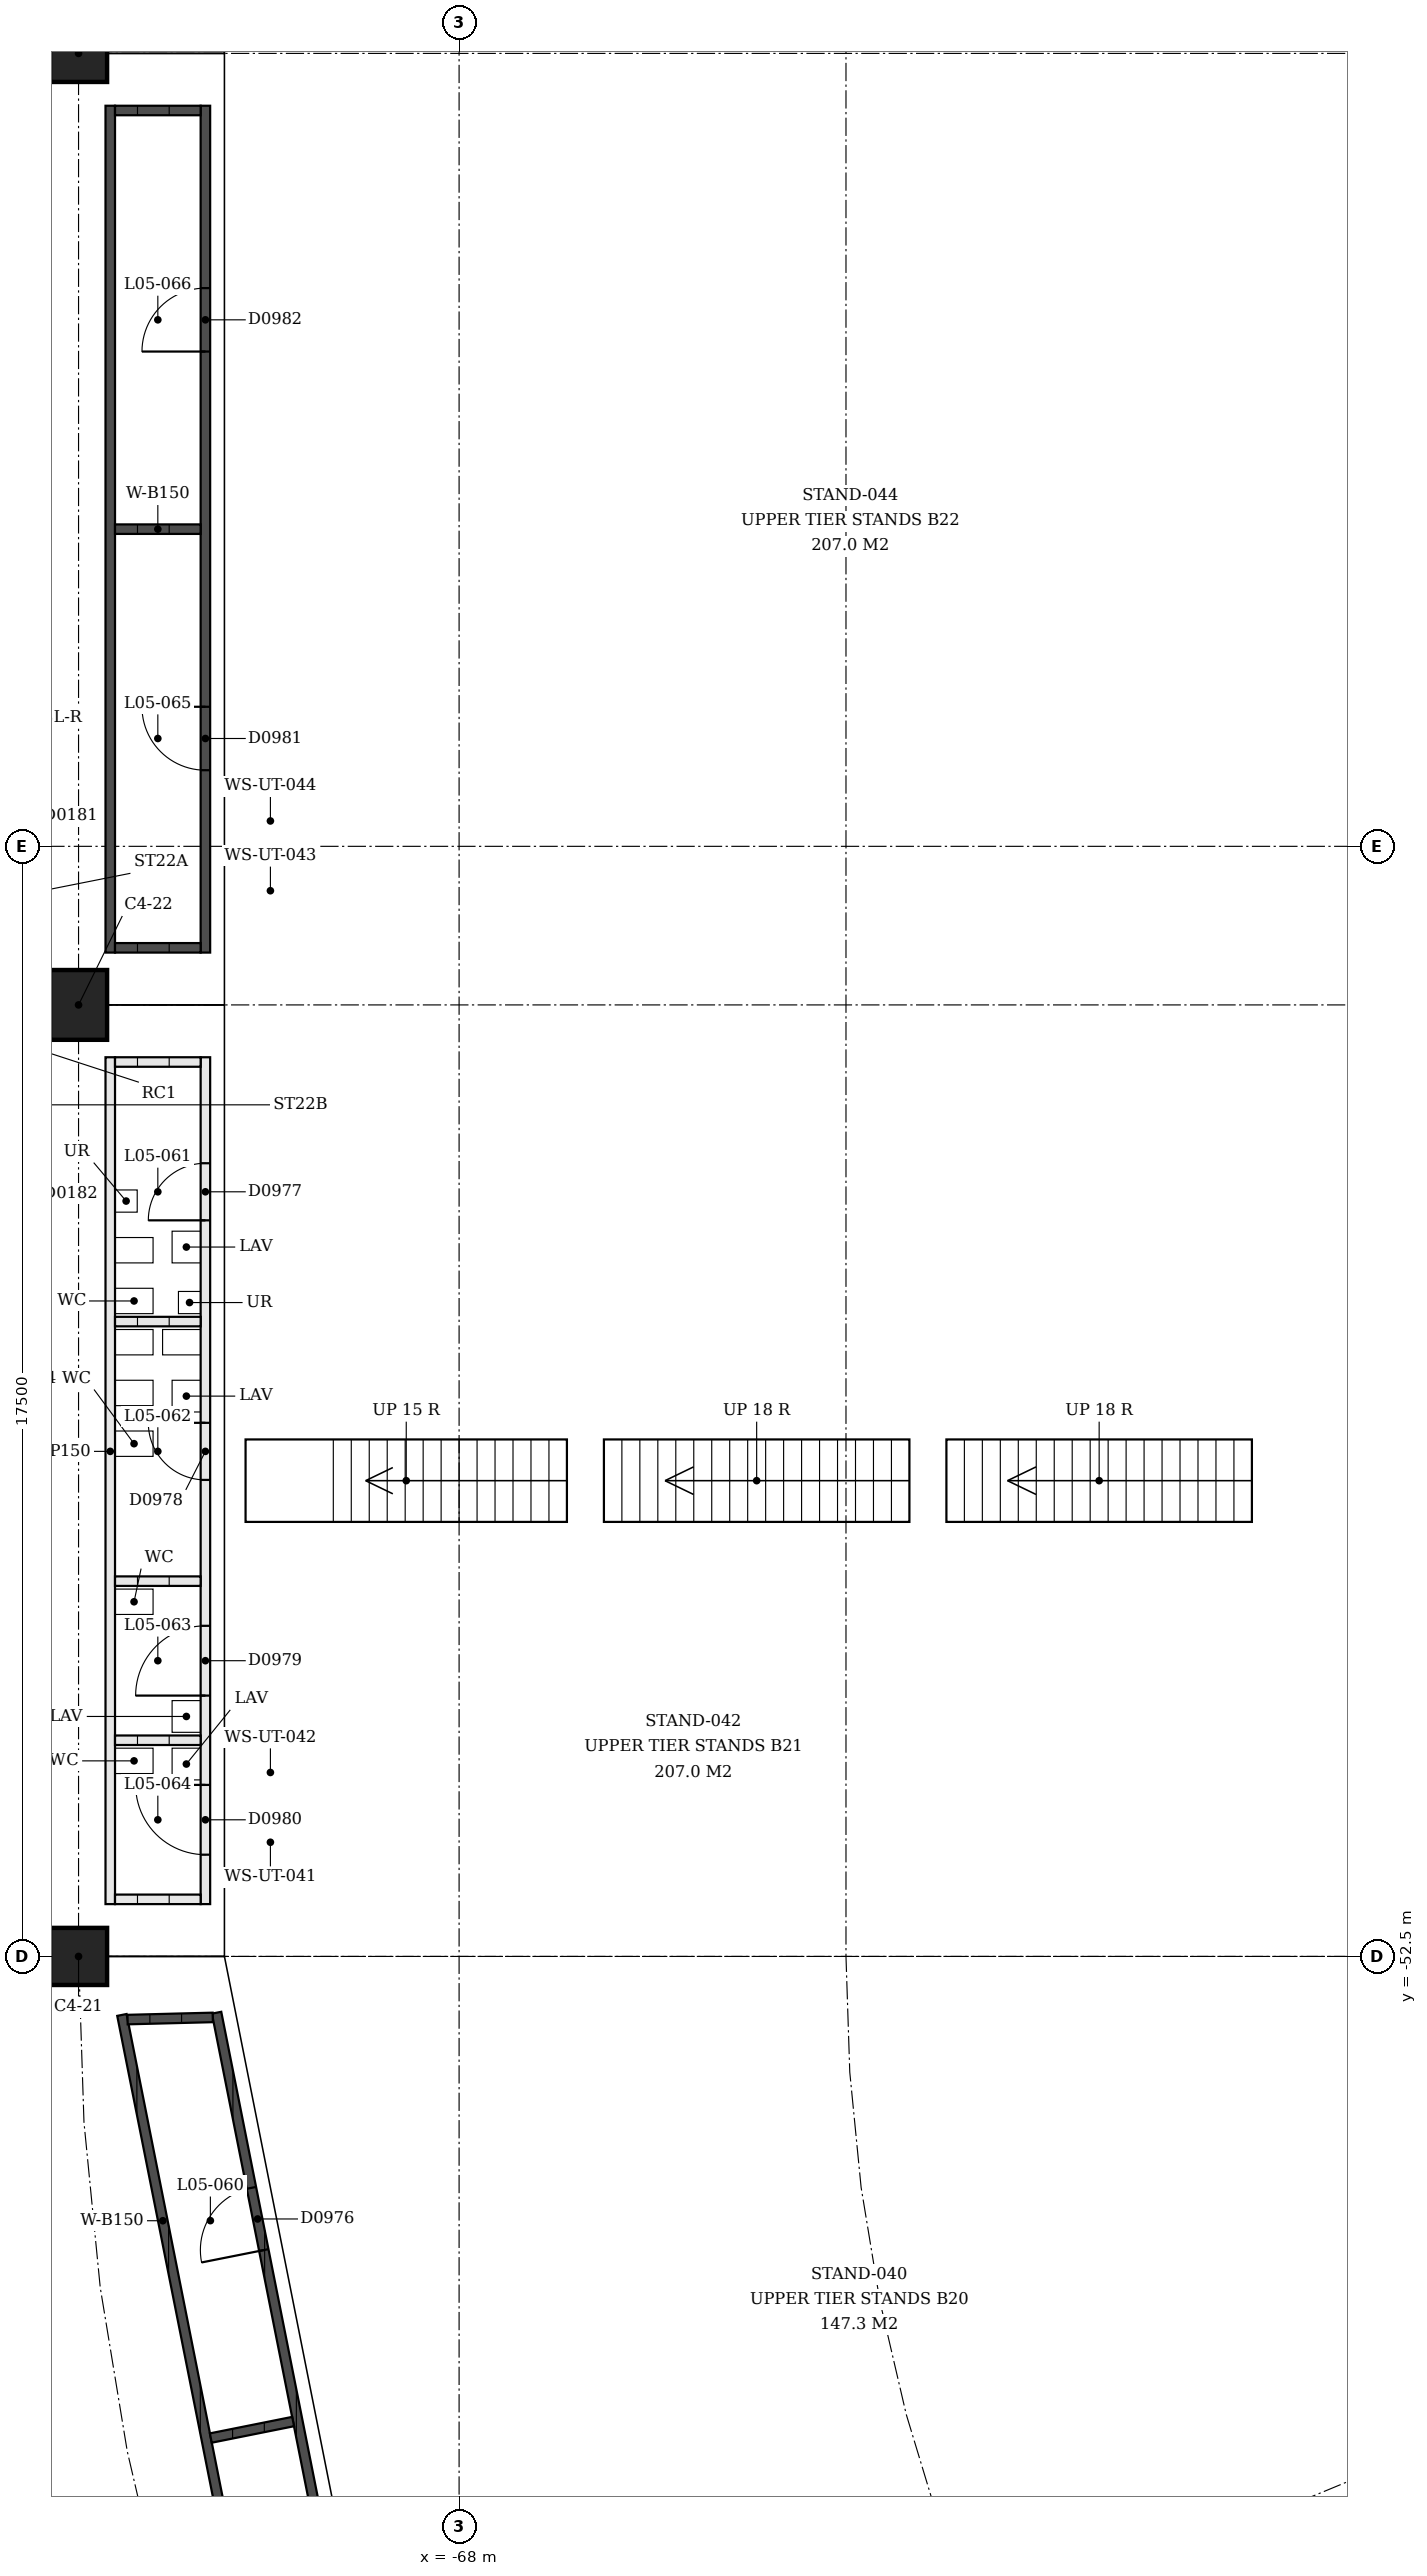
"""IFC4 building model, lengths in metres.
Left out: names, types, materials, properties, quantities, classifications, styles, units other than length and angle.
Written with IfcOpenShell. Run it as: python <this file> out.ifc"""

import sys

from ifc_helpers import new_model, si_unit, direction, frame, frame_2d, origin, origin_2d, place, context, subcontext, project, spatial, rectangle, extrude, element, fill, save


model = new_model("IFC4")
c1 = context("Model", 3, precision=1e-05, world=origin(), true_north=direction((0.0, 1.0)))
c2 = subcontext(c1, "Body", "Model", "MODEL_VIEW")
j1 = project(units=[si_unit("LENGTHUNIT", "METRE"), si_unit("PLANEANGLEUNIT", "RADIAN")], contexts=[c1])
p1 = place(None, origin())
s1 = spatial("IfcSite", under=j1, at=p1, CompositionType="ELEMENT")
p2 = place(p1, origin())
s2 = spatial("IfcBuilding", under=s1, at=p2, CompositionType="ELEMENT")
p3 = place(p2, frame((0.0, 0.0, 22.5)))
s3 = spatial("IfcBuildingStorey", under=s2, at=p3, CompositionType="ELEMENT", Elevation=22.5)
p4 = place(p3, frame((-74.0, -52.5, 0.0), z_axis=(0.0, 0.0, 1.0), x_axis=(0.0, -1.0, 0.0)))
e1 = element("IfcColumn", 1, at=p4, inside=s3, PredefinedType="COLUMN", context=c2, shape_type="SweptSolid", body=[
    extrude(rectangle(XDim=0.9, YDim=0.9, at=origin_2d()), origin(), (0.0, 0.0, 1.0), 6.5),
])
p5 = place(p3, frame((-74.0, -37.5, 0.0), z_axis=(0.0, 0.0, 1.0), x_axis=(0.0, -1.0, 0.0)))
e2 = element("IfcColumn", 2, at=p5, inside=s3, PredefinedType="COLUMN", context=c2, shape_type="SweptSolid", body=[
    extrude(rectangle(XDim=1.1, YDim=0.9, at=origin_2d()), origin(), (0.0, 0.0, 1.0), 6.5),
])
p6 = place(p3, frame((-74.0, -22.5, 0.0), z_axis=(0.0, 0.0, 1.0), x_axis=(0.0, -1.0, 0.0)))
e3 = element("IfcColumn", 3, at=p6, inside=s3, PredefinedType="COLUMN", context=c2, shape_type="SweptSolid", body=[
    extrude(rectangle(XDim=0.9, YDim=0.9, at=origin_2d()), origin(), (0.0, 0.0, 1.0), 6.5),
])
p7 = place(p3, frame((-69.265, -66.249, 0.0), z_axis=(0.0, 0.0, 1.0), x_axis=(-0.195095631841, 0.980784224198, 0.0)))
e4 = element("IfcWall", 4, at=p7, inside=s3, PredefinedType="SOLIDWALL", context=c2, shape_type="SweptSolid", body=[
    extrude(rectangle(XDim=13.113, YDim=0.15, at=frame_2d((6.557, 0.0))), origin(), (0.0, 0.0, 1.0), 3.0),
])
p8 = place(p7, frame((2.815, 0.0, 0.0)))
e5 = element("IfcOpeningElement", 5, at=p8, cuts=e4, PredefinedType="OPENING", context=c2, shape_type="SweptSolid", body=[
    extrude(rectangle(XDim=1.0, YDim=2.1, at=frame_2d((0.5, 1.05))), frame((0.0, 0.075, 0.0), z_axis=(0.0, -1.0, 0.0), x_axis=(1.0, 0.0, 0.0)), (0.0, 0.0, 1.0), 0.15),
])
p9 = place(p7, frame((9.298, 0.0, 0.0)))
e6 = element("IfcOpeningElement", 6, at=p9, cuts=e4, PredefinedType="OPENING", context=c2, shape_type="SweptSolid", body=[
    extrude(rectangle(XDim=1.0, YDim=2.1, at=frame_2d((0.5, 1.05))), frame((0.0, 0.075, 0.0), z_axis=(0.0, -1.0, 0.0), x_axis=(1.0, 0.0, 0.0)), (0.0, 0.0, 1.0), 0.15),
])
p10 = place(p3, frame((-70.657, -66.791, 0.0), z_axis=(0.0, 0.0, 1.0), x_axis=(-0.195103376128, 0.980782683689, 0.0)))
e7 = element("IfcWall", 7, at=p10, inside=s3, PredefinedType="SOLIDWALL", context=c2, shape_type="SweptSolid", body=[
    extrude(rectangle(XDim=13.631, YDim=0.15, at=frame_2d((6.815, 0.0))), origin(), (0.0, 0.0, 1.0), 3.0),
])
p11 = place(p3, frame((-70.616, -59.832, 0.0), z_axis=(0.0, 0.0, 1.0), x_axis=(-0.980531003602, -0.196364332237, 0.0)))
e8 = element("IfcWall", 8, at=p11, inside=s3, PredefinedType="SOLIDWALL", context=c2, shape_type="SweptSolid", body=[
    extrude(rectangle(XDim=1.324, YDim=0.15, at=frame_2d((0.662, 0.0))), origin(), (0.0, 0.0, 1.0), 3.0),
])
p12 = place(p3, frame((-71.884, -53.461, 0.0), z_axis=(0.0, 0.0, 1.0), x_axis=(-0.999681029438, -0.025255482205, 0.0)))
e9 = element("IfcWall", 9, at=p12, inside=s3, PredefinedType="SOLIDWALL", context=c2, shape_type="SweptSolid", body=[
    extrude(rectangle(XDim=1.344, YDim=0.15, at=frame_2d((0.672, 0.0))), origin(), (0.0, 0.0, 1.0), 3.0),
])
p13 = place(p3, frame((-72.0, -38.325, 0.0), z_axis=(0.0, 0.0, 1.0), x_axis=(0.0, -1.0, 0.0)))
e10 = element("IfcWall", 10, at=p13, inside=s3, PredefinedType="PARTITIONING", context=c2, shape_type="SweptSolid", body=[
    extrude(rectangle(XDim=13.35, YDim=0.15, at=frame_2d((6.675, 0.0))), origin(), (0.0, 0.0, 1.0), 3.0),
])
p14 = place(p13, frame((1.671, 0.0, 0.0)))
e11 = element("IfcOpeningElement", 11, at=p14, cuts=e10, PredefinedType="OPENING", context=c2, shape_type="SweptSolid", body=[
    extrude(rectangle(XDim=0.9, YDim=2.1, at=frame_2d((0.45, 1.05))), frame((0.0, 0.075, 0.0), z_axis=(0.0, -1.0, 0.0), x_axis=(1.0, 0.0, 0.0)), (0.0, 0.0, 1.0), 0.15),
])
p15 = place(p13, frame((5.763, 0.0, 0.0)))
e12 = element("IfcOpeningElement", 12, at=p15, cuts=e10, PredefinedType="OPENING", context=c2, shape_type="SweptSolid", body=[
    extrude(rectangle(XDim=0.9, YDim=2.1, at=frame_2d((0.45, 1.05))), frame((0.0, 0.075, 0.0), z_axis=(0.0, -1.0, 0.0), x_axis=(1.0, 0.0, 0.0)), (0.0, 0.0, 1.0), 0.15),
])
p16 = place(p13, frame((8.963, 0.0, 0.0)))
e13 = element("IfcOpeningElement", 13, at=p16, cuts=e10, PredefinedType="OPENING", context=c2, shape_type="SweptSolid", body=[
    extrude(rectangle(XDim=1.1, YDim=2.1, at=frame_2d((0.55, 1.05))), frame((0.0, 0.075, 0.0), z_axis=(0.0, -1.0, 0.0), x_axis=(1.0, 0.0, 0.0)), (0.0, 0.0, 1.0), 0.15),
])
p17 = place(p13, frame((11.471, 0.0, 0.0)))
e14 = element("IfcOpeningElement", 14, at=p17, cuts=e10, PredefinedType="OPENING", context=c2, shape_type="SweptSolid", body=[
    extrude(rectangle(XDim=1.1, YDim=2.1, at=frame_2d((0.55, 1.05))), frame((0.0, 0.075, 0.0), z_axis=(0.0, -1.0, 0.0), x_axis=(1.0, 0.0, 0.0)), (0.0, 0.0, 1.0), 0.15),
])
p18 = place(p3, frame((-73.5, -38.325, 0.0), z_axis=(0.0, 0.0, 1.0), x_axis=(0.0, -1.0, 0.0)))
e15 = element("IfcWall", 15, at=p18, inside=s3, PredefinedType="PARTITIONING", context=c2, shape_type="SweptSolid", body=[
    extrude(rectangle(XDim=13.35, YDim=0.15, at=frame_2d((6.675, 0.0))), origin(), (0.0, 0.0, 1.0), 3.0),
])
for number, where, z_axis, x_axis in (
    (16, (-72.075, -38.4, 0.0), (0.0, 0.0, 1.0), (-1.0, 0.0, 0.0)),
    (17, (-72.075, -42.492, 0.0), (0.0, 0.0, 1.0), (-1.0, 0.0, 0.0)),
    (18, (-72.075, -46.584, 0.0), (0.0, 0.0, 1.0), (-1.0, 0.0, 0.0)),
    (19, (-72.075, -49.092, 0.0), (0.0, 0.0, 1.0), (-1.0, 0.0, 0.0)),
    (20, (-72.075, -51.6, 0.0), (0.0, 0.0, 1.0), (-1.0, 0.0, 0.0)),
):
    element("IfcWall", number, at=place(p3, frame(where, z_axis=z_axis, x_axis=x_axis)), inside=s3, PredefinedType="PARTITIONING", context=c2, shape_type="SweptSolid", body=[
        extrude(rectangle(XDim=1.35, YDim=0.15, at=frame_2d((0.675, 0.0))), origin(), (0.0, 0.0, 1.0), 3.0),
    ])
p19 = place(p3, frame((-72.0, -36.675, 0.0), z_axis=(0.0, 0.0, 1.0), x_axis=(0.0, 1.0, 0.0)))
e21 = element("IfcWall", 21, at=p19, inside=s3, PredefinedType="SOLIDWALL", context=c2, shape_type="SweptSolid", body=[
    extrude(rectangle(XDim=13.35, YDim=0.15, at=frame_2d((6.675, 0.0))), origin(), (0.0, 0.0, 1.0), 3.0),
])
p20 = place(p19, frame((2.875, 0.0, 0.0)))
e22 = element("IfcOpeningElement", 22, at=p20, cuts=e21, PredefinedType="OPENING", context=c2, shape_type="SweptSolid", body=[
    extrude(rectangle(XDim=1.0, YDim=2.1, at=frame_2d((0.5, 1.05))), frame((0.0, 0.075, 0.0), z_axis=(0.0, -1.0, 0.0), x_axis=(1.0, 0.0, 0.0)), (0.0, 0.0, 1.0), 0.15),
])
p21 = place(p19, frame((9.475, 0.0, 0.0)))
e23 = element("IfcOpeningElement", 23, at=p21, cuts=e21, PredefinedType="OPENING", context=c2, shape_type="SweptSolid", body=[
    extrude(rectangle(XDim=1.0, YDim=2.1, at=frame_2d((0.5, 1.05))), frame((0.0, 0.075, 0.0), z_axis=(0.0, -1.0, 0.0), x_axis=(1.0, 0.0, 0.0)), (0.0, 0.0, 1.0), 0.15),
])
p22 = place(p3, frame((-73.5, -36.675, 0.0), z_axis=(0.0, 0.0, 1.0), x_axis=(0.0, 1.0, 0.0)))
e24 = element("IfcWall", 24, at=p22, inside=s3, PredefinedType="SOLIDWALL", context=c2, shape_type="SweptSolid", body=[
    extrude(rectangle(XDim=13.35, YDim=0.15, at=frame_2d((6.675, 0.0))), origin(), (0.0, 0.0, 1.0), 3.0),
])
for number, where, z_axis, x_axis in (
    (25, (-72.075, -36.6, 0.0), (0.0, 0.0, 1.0), (-1.0, 0.0, 0.0)),
    (26, (-72.075, -30.0, 0.0), (0.0, 0.0, 1.0), (-1.0, 0.0, 0.0)),
    (27, (-72.075, -23.4, 0.0), (0.0, 0.0, 1.0), (-1.0, 0.0, 0.0)),
):
    element("IfcWall", number, at=place(p3, frame(where, z_axis=z_axis, x_axis=x_axis)), inside=s3, PredefinedType="SOLIDWALL", context=c2, shape_type="SweptSolid", body=[
        extrude(rectangle(XDim=1.35, YDim=0.15, at=frame_2d((0.675, 0.0))), origin(), (0.0, 0.0, 1.0), 3.0),
    ])
p23 = place(p9, origin())
e28 = element("IfcDoor", 28, at=p23, inside=s3, OperationType="SINGLE_SWING_RIGHT", PredefinedType="DOOR", context=c2, shape_type="SweptSolid", body=[
    extrude(rectangle(XDim=1.0, YDim=2.1, at=frame_2d((0.5, 1.05))), frame((0.0, 0.025, 0.0), z_axis=(0.0, -1.0, 0.0), x_axis=(1.0, 0.0, 0.0)), (0.0, 0.0, 1.0), 0.05),
])
fill(e6, e28)
p24 = place(p14, origin())
e29 = element("IfcDoor", 29, at=p24, inside=s3, OperationType="SINGLE_SWING_RIGHT", PredefinedType="DOOR", context=c2, shape_type="SweptSolid", body=[
    extrude(rectangle(XDim=0.9, YDim=2.1, at=frame_2d((0.45, 1.05))), frame((0.0, 0.025, 0.0), z_axis=(0.0, -1.0, 0.0), x_axis=(1.0, 0.0, 0.0)), (0.0, 0.0, 1.0), 0.05),
])
fill(e11, e29)
p25 = place(p15, origin())
e30 = element("IfcDoor", 30, at=p25, inside=s3, OperationType="SINGLE_SWING_LEFT", PredefinedType="DOOR", context=c2, shape_type="SweptSolid", body=[
    extrude(rectangle(XDim=0.9, YDim=2.1, at=frame_2d((0.45, 1.05))), frame((0.0, 0.025, 0.0), z_axis=(0.0, -1.0, 0.0), x_axis=(1.0, 0.0, 0.0)), (0.0, 0.0, 1.0), 0.05),
])
fill(e12, e30)
p26 = place(p16, origin())
e31 = element("IfcDoor", 31, at=p26, inside=s3, OperationType="SINGLE_SWING_RIGHT", PredefinedType="DOOR", context=c2, shape_type="SweptSolid", body=[
    extrude(rectangle(XDim=1.1, YDim=2.1, at=frame_2d((0.55, 1.05))), frame((0.0, 0.025, 0.0), z_axis=(0.0, -1.0, 0.0), x_axis=(1.0, 0.0, 0.0)), (0.0, 0.0, 1.0), 0.05),
])
fill(e13, e31)
p27 = place(p17, origin())
e32 = element("IfcDoor", 32, at=p27, inside=s3, OperationType="SINGLE_SWING_LEFT", PredefinedType="DOOR", context=c2, shape_type="SweptSolid", body=[
    extrude(rectangle(XDim=1.1, YDim=2.1, at=frame_2d((0.55, 1.05))), frame((0.0, 0.025, 0.0), z_axis=(0.0, -1.0, 0.0), x_axis=(1.0, 0.0, 0.0)), (0.0, 0.0, 1.0), 0.05),
])
fill(e14, e32)
p28 = place(p20, origin())
e33 = element("IfcDoor", 33, at=p28, inside=s3, OperationType="SINGLE_SWING_LEFT", PredefinedType="DOOR", context=c2, shape_type="SweptSolid", body=[
    extrude(rectangle(XDim=1.0, YDim=2.1, at=frame_2d((0.5, 1.05))), frame((0.0, 0.025, 0.0), z_axis=(0.0, -1.0, 0.0), x_axis=(1.0, 0.0, 0.0)), (0.0, 0.0, 1.0), 0.05),
])
fill(e22, e33)
p29 = place(p21, origin())
e34 = element("IfcDoor", 34, at=p29, inside=s3, OperationType="SINGLE_SWING_RIGHT", PredefinedType="DOOR", context=c2, shape_type="SweptSolid", body=[
    extrude(rectangle(XDim=1.0, YDim=2.1, at=frame_2d((0.5, 1.05))), frame((0.0, 0.025, 0.0), z_axis=(0.0, -1.0, 0.0), x_axis=(1.0, 0.0, 0.0)), (0.0, 0.0, 1.0), 0.05),
])
fill(e23, e34)
save(model, sys.argv[1])
